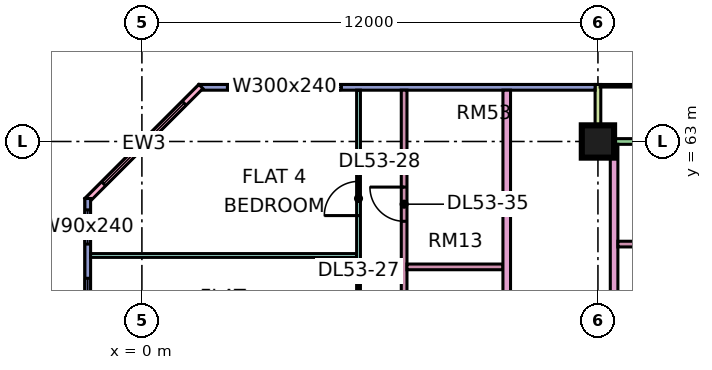
"""IFC4 building model, lengths in metres.
Left out: names, types, materials, properties, quantities, classifications, styles, units other than length and angle.
Written with IfcOpenShell. Run it as: python <this file> out.ifc"""

import sys

from ifc_helpers import new_model, si_unit, direction, frame, frame_2d, origin, origin_2d, place, context, subcontext, project, spatial, rectangle, extrude, element, fill, save


model = new_model("IFC4")
c1 = context("Model", 3, precision=1e-05, world=origin(), true_north=direction((0.0, 1.0)))
c2 = subcontext(c1, "Body", "Model", "MODEL_VIEW")
j1 = project(units=[si_unit("LENGTHUNIT", "METRE"), si_unit("PLANEANGLEUNIT", "RADIAN")], contexts=[c1])
p1 = place(None, origin())
s1 = spatial("IfcSite", under=j1, at=p1, CompositionType="ELEMENT")
p2 = place(p1, origin())
s2 = spatial("IfcBuilding", under=s1, at=p2, CompositionType="ELEMENT")
p3 = place(p2, frame((0.0, 0.0, 226.65)))
s3 = spatial("IfcBuildingStorey", under=s2, at=p3, CompositionType="ELEMENT", Elevation=226.65)
p4 = place(p3, frame((12.0, 63.0, 0.0), z_axis=(0.0, 0.0, 1.0), x_axis=(1.0, 0.0, 0.0)))
e1 = element("IfcColumn", 1, at=p4, inside=s3, PredefinedType="COLUMN", context=c2, shape_type="SweptSolid", body=[
    extrude(rectangle(XDim=0.85, YDim=0.85, at=origin_2d()), origin(), (0.0, 0.0, 1.0), 3.75),
])
p5 = place(p3, frame((22.425, 63.0, 0.0), z_axis=(0.0, 0.0, 1.0), x_axis=(-1.0, 0.0, 0.0)))
e2 = element("IfcWall", 2, at=p5, inside=s3, PredefinedType="SOLIDWALL", context=c2, shape_type="SweptSolid", body=[
    extrude(rectangle(XDim=10.35, YDim=0.15, at=frame_2d((5.175, 0.0))), origin(), (0.0, 0.0, 1.0), 3.35),
])
p6 = place(p5, frame((1.4, 0.0, 0.0)))
e3 = element("IfcOpeningElement", 3, at=p6, cuts=e2, PredefinedType="OPENING", context=c2, shape_type="SweptSolid", body=[
    extrude(rectangle(XDim=1.8, YDim=2.4, at=frame_2d((0.9, 1.2))), frame((0.0, 0.085, 0.0), z_axis=(0.0, -1.0, 0.0), x_axis=(1.0, 0.0, 0.0)), (0.0, 0.0, 1.0), 0.17),
])
p7 = place(p5, frame((5.75, 0.0, 0.45)))
e4 = element("IfcOpeningElement", 4, at=p7, cuts=e2, PredefinedType="OPENING", context=c2, shape_type="SweptSolid", body=[
    extrude(rectangle(XDim=3.0, YDim=2.4, at=frame_2d((1.5, 1.2))), frame((0.0, 0.085, 0.0), z_axis=(0.0, -1.0, 0.0), x_axis=(1.0, 0.0, 0.0)), (0.0, 0.0, 1.0), 0.17),
])
p8 = place(p3, frame((12.0, 64.5, 0.0), z_axis=(0.0, 0.0, 1.0), x_axis=(0.0, -1.0, 0.0)))
e5 = element("IfcWall", 5, at=p8, inside=s3, PredefinedType="SOLIDWALL", context=c2, shape_type="SweptSolid", body=[
    extrude(rectangle(XDim=1.5, YDim=0.15, at=frame_2d((0.75, 0.0))), origin(), (0.0, 0.0, 1.0), 3.35),
])
p9 = place(p3, frame((11.925, 64.425, 0.0), z_axis=(0.0, 0.0, 1.0), x_axis=(-1.0, 0.0, 0.0)))
e6 = element("IfcWall", 6, at=p9, inside=s3, PredefinedType="SOLIDWALL", context=c2, shape_type="SweptSolid", body=[
    extrude(rectangle(XDim=10.425, YDim=0.15, at=frame_2d((5.212, 0.0))), origin(), (0.0, 0.0, 1.0), 3.35),
])
p10 = place(p9, frame((6.675, 0.0, 0.45)))
e7 = element("IfcOpeningElement", 7, at=p10, cuts=e6, PredefinedType="OPENING", context=c2, shape_type="SweptSolid", body=[
    extrude(rectangle(XDim=3.0, YDim=2.4, at=frame_2d((1.5, 1.2))), frame((0.0, 0.085, 0.0), z_axis=(0.0, -1.0, 0.0), x_axis=(1.0, 0.0, 0.0)), (0.0, 0.0, 1.0), 0.17),
])
p11 = place(p3, frame((1.553, 64.447, 0.0), z_axis=(0.0, 0.0, 1.0), x_axis=(-0.707106781187, -0.707106781187, 0.0)))
e8 = element("IfcWall", 8, at=p11, inside=s3, PredefinedType="SOLIDWALL", context=c2, shape_type="SweptSolid", body=[
    extrude(rectangle(XDim=4.243, YDim=0.15, at=frame_2d((2.121, 0.0))), origin(), (0.0, 0.0, 1.0), 3.35),
])
p12 = place(p11, frame((0.621, 0.0, 0.45)))
e9 = element("IfcOpeningElement", 9, at=p12, cuts=e8, PredefinedType="OPENING", context=c2, shape_type="SweptSolid", body=[
    extrude(rectangle(XDim=3.0, YDim=2.4, at=frame_2d((1.5, 1.2))), frame((0.0, 0.085, 0.0), z_axis=(0.0, -1.0, 0.0), x_axis=(1.0, 0.0, 0.0)), (0.0, 0.0, 1.0), 0.17),
])
p13 = place(p3, frame((-1.425, 61.5, 0.0), z_axis=(0.0, 0.0, 1.0), x_axis=(0.0, -1.0, 0.0)))
e10 = element("IfcWall", 10, at=p13, inside=s3, PredefinedType="SOLIDWALL", context=c2, shape_type="SweptSolid", body=[
    extrude(rectangle(XDim=13.425, YDim=0.15, at=frame_2d((6.712, 0.0))), origin(), (0.0, 0.0, 1.0), 3.35),
])
p14 = place(p13, frame((0.3, 0.0, 0.45)))
e11 = element("IfcOpeningElement", 11, at=p14, cuts=e10, PredefinedType="OPENING", context=c2, shape_type="SweptSolid", body=[
    extrude(rectangle(XDim=0.9, YDim=2.4, at=frame_2d((0.45, 1.2))), frame((0.0, 0.085, 0.0), z_axis=(0.0, -1.0, 0.0), x_axis=(1.0, 0.0, 0.0)), (0.0, 0.0, 1.0), 0.17),
])
p15 = place(p13, frame((2.1, 0.0, 0.45)))
e12 = element("IfcOpeningElement", 12, at=p15, cuts=e10, PredefinedType="OPENING", context=c2, shape_type="SweptSolid", body=[
    extrude(rectangle(XDim=1.8, YDim=2.4, at=frame_2d((0.9, 1.2))), frame((0.0, 0.085, 0.0), z_axis=(0.0, -1.0, 0.0), x_axis=(1.0, 0.0, 0.0)), (0.0, 0.0, 1.0), 0.17),
])
p16 = place(p13, frame((5.1, 0.0, 0.45)))
e13 = element("IfcOpeningElement", 13, at=p16, cuts=e10, PredefinedType="OPENING", context=c2, shape_type="SweptSolid", body=[
    extrude(rectangle(XDim=1.8, YDim=2.4, at=frame_2d((0.9, 1.2))), frame((0.0, 0.085, 0.0), z_axis=(0.0, -1.0, 0.0), x_axis=(1.0, 0.0, 0.0)), (0.0, 0.0, 1.0), 0.17),
])
p17 = place(p13, frame((8.962, 0.0, 0.45)))
e14 = element("IfcOpeningElement", 14, at=p17, cuts=e10, PredefinedType="OPENING", context=c2, shape_type="SweptSolid", body=[
    extrude(rectangle(XDim=3.0, YDim=2.4, at=frame_2d((1.5, 1.2))), frame((0.0, 0.085, 0.0), z_axis=(0.0, -1.0, 0.0), x_axis=(1.0, 0.0, 0.0)), (0.0, 0.0, 1.0), 0.17),
])
p18 = place(p3, frame((-1.351, 60.0, 0.0), z_axis=(0.0, 0.0, 1.0), x_axis=(1.0, 0.0, 0.0)))
e15 = element("IfcWall", 15, at=p18, inside=s3, PredefinedType="PARTITIONING", context=c2, shape_type="SweptSolid", body=[
    extrude(rectangle(XDim=7.001, YDim=0.1, at=frame_2d((3.5, 0.0))), origin(), (0.0, 0.0, 1.0), 3.35),
])
p19 = place(p3, frame((5.7, 36.1, 0.0), z_axis=(0.0, 0.0, 1.0), x_axis=(0.0, 1.0, 0.0)))
e16 = element("IfcWall", 16, at=p19, inside=s3, PredefinedType="PARTITIONING", context=c2, shape_type="SweptSolid", body=[
    extrude(rectangle(XDim=28.25, YDim=0.1, at=frame_2d((14.125, 0.0))), origin(), (0.0, 0.0, 1.0), 3.35),
])
p20 = place(p19, frame((0.95, 0.0, 0.0)))
e17 = element("IfcOpeningElement", 17, at=p20, cuts=e16, PredefinedType="OPENING", context=c2, shape_type="SweptSolid", body=[
    extrude(rectangle(XDim=0.9, YDim=2.1, at=frame_2d((0.45, 1.05))), frame((0.0, 0.06, 0.0), z_axis=(0.0, -1.0, 0.0), x_axis=(1.0, 0.0, 0.0)), (0.0, 0.0, 1.0), 0.12),
])
p21 = place(p19, frame((3.95, 0.0, 0.0)))
e18 = element("IfcOpeningElement", 18, at=p21, cuts=e16, PredefinedType="OPENING", context=c2, shape_type="SweptSolid", body=[
    extrude(rectangle(XDim=0.9, YDim=2.1, at=frame_2d((0.45, 1.05))), frame((0.0, 0.06, 0.0), z_axis=(0.0, -1.0, 0.0), x_axis=(1.0, 0.0, 0.0)), (0.0, 0.0, 1.0), 0.12),
])
p22 = place(p19, frame((6.95, 0.0, 0.0)))
e19 = element("IfcOpeningElement", 19, at=p22, cuts=e16, PredefinedType="OPENING", context=c2, shape_type="SweptSolid", body=[
    extrude(rectangle(XDim=0.9, YDim=2.1, at=frame_2d((0.45, 1.05))), frame((0.0, 0.06, 0.0), z_axis=(0.0, -1.0, 0.0), x_axis=(1.0, 0.0, 0.0)), (0.0, 0.0, 1.0), 0.12),
])
p23 = place(p19, frame((18.95, 0.0, 0.0)))
e20 = element("IfcOpeningElement", 20, at=p23, cuts=e16, PredefinedType="OPENING", context=c2, shape_type="SweptSolid", body=[
    extrude(rectangle(XDim=0.9, YDim=2.1, at=frame_2d((0.45, 1.05))), frame((0.0, 0.06, 0.0), z_axis=(0.0, -1.0, 0.0), x_axis=(1.0, 0.0, 0.0)), (0.0, 0.0, 1.0), 0.12),
])
p24 = place(p19, frame((21.95, 0.0, 0.0)))
e21 = element("IfcOpeningElement", 21, at=p24, cuts=e16, PredefinedType="OPENING", context=c2, shape_type="SweptSolid", body=[
    extrude(rectangle(XDim=0.9, YDim=2.1, at=frame_2d((0.45, 1.05))), frame((0.0, 0.06, 0.0), z_axis=(0.0, -1.0, 0.0), x_axis=(1.0, 0.0, 0.0)), (0.0, 0.0, 1.0), 0.12),
])
p25 = place(p19, frame((24.95, 0.0, 0.0)))
e22 = element("IfcOpeningElement", 22, at=p25, cuts=e16, PredefinedType="OPENING", context=c2, shape_type="SweptSolid", body=[
    extrude(rectangle(XDim=0.9, YDim=2.1, at=frame_2d((0.45, 1.05))), frame((0.0, 0.06, 0.0), z_axis=(0.0, -1.0, 0.0), x_axis=(1.0, 0.0, 0.0)), (0.0, 0.0, 1.0), 0.12),
])
p26 = place(p19, frame((12.95, 0.0, 0.0)))
e23 = element("IfcOpeningElement", 23, at=p26, cuts=e16, PredefinedType="OPENING", context=c2, shape_type="SweptSolid", body=[
    extrude(rectangle(XDim=0.9, YDim=2.1, at=frame_2d((0.45, 1.05))), frame((0.0, 0.06, 0.0), z_axis=(0.0, -1.0, 0.0), x_axis=(1.0, 0.0, 0.0)), (0.0, 0.0, 1.0), 0.12),
])
p27 = place(p3, frame((6.9, 39.25, 0.0), z_axis=(0.0, 0.0, 1.0), x_axis=(0.0, 1.0, 0.0)))
e24 = element("IfcWall", 24, at=p27, inside=s3, PredefinedType="PARTITIONING", context=c2, shape_type="SweptSolid", body=[
    extrude(rectangle(XDim=25.1, YDim=0.15, at=frame_2d((12.55, 0.0))), origin(), (0.0, 0.0, 1.0), 3.35),
])
p28 = place(p27, frame((9.5, 0.0, 0.0)))
e25 = element("IfcOpeningElement", 25, at=p28, cuts=e24, PredefinedType="OPENING", context=c2, shape_type="SweptSolid", body=[
    extrude(rectangle(XDim=0.8, YDim=2.1, at=frame_2d((0.4, 1.05))), frame((0.0, 0.085, 0.0), z_axis=(0.0, -1.0, 0.0), x_axis=(1.0, 0.0, 0.0)), (0.0, 0.0, 1.0), 0.17),
])
p29 = place(p27, frame((12.65, 0.0, 0.0)))
e26 = element("IfcOpeningElement", 26, at=p29, cuts=e24, PredefinedType="OPENING", context=c2, shape_type="SweptSolid", body=[
    extrude(rectangle(XDim=0.9, YDim=2.1, at=frame_2d((0.45, 1.05))), frame((0.0, 0.085, 0.0), z_axis=(0.0, -1.0, 0.0), x_axis=(1.0, 0.0, 0.0)), (0.0, 0.0, 1.0), 0.17),
])
p30 = place(p27, frame((18.8, 0.0, 0.0)))
e27 = element("IfcOpeningElement", 27, at=p30, cuts=e24, PredefinedType="OPENING", context=c2, shape_type="SweptSolid", body=[
    extrude(rectangle(XDim=0.8, YDim=2.1, at=frame_2d((0.4, 1.05))), frame((0.0, 0.085, 0.0), z_axis=(0.0, -1.0, 0.0), x_axis=(1.0, 0.0, 0.0)), (0.0, 0.0, 1.0), 0.17),
])
p31 = place(p27, frame((6.8, 0.0, 0.0)))
e28 = element("IfcOpeningElement", 28, at=p31, cuts=e24, PredefinedType="OPENING", context=c2, shape_type="SweptSolid", body=[
    extrude(rectangle(XDim=0.9, YDim=2.1, at=frame_2d((0.45, 1.05))), frame((0.0, 0.085, 0.0), z_axis=(0.0, -1.0, 0.0), x_axis=(1.0, 0.0, 0.0)), (0.0, 0.0, 1.0), 0.17),
])
p32 = place(p27, frame((21.65, 0.0, 0.0)))
e29 = element("IfcOpeningElement", 29, at=p32, cuts=e24, PredefinedType="OPENING", context=c2, shape_type="SweptSolid", body=[
    extrude(rectangle(XDim=0.9, YDim=2.1, at=frame_2d((0.45, 1.05))), frame((0.0, 0.085, 0.0), z_axis=(0.0, -1.0, 0.0), x_axis=(1.0, 0.0, 0.0)), (0.0, 0.0, 1.0), 0.17),
])
p33 = place(p27, frame((3.95, 0.0, 0.0)))
e30 = element("IfcOpeningElement", 30, at=p33, cuts=e24, PredefinedType="OPENING", context=c2, shape_type="SweptSolid", body=[
    extrude(rectangle(XDim=0.8, YDim=2.1, at=frame_2d((0.4, 1.05))), frame((0.0, 0.085, 0.0), z_axis=(0.0, -1.0, 0.0), x_axis=(1.0, 0.0, 0.0)), (0.0, 0.0, 1.0), 0.17),
])
p34 = place(p27, frame((15.8, 0.0, 0.0)))
e31 = element("IfcOpeningElement", 31, at=p34, cuts=e24, PredefinedType="OPENING", context=c2, shape_type="SweptSolid", body=[
    extrude(rectangle(XDim=0.8, YDim=2.1, at=frame_2d((0.4, 1.05))), frame((0.0, 0.085, 0.0), z_axis=(0.0, -1.0, 0.0), x_axis=(1.0, 0.0, 0.0)), (0.0, 0.0, 1.0), 0.17),
])
p35 = place(p3, frame((6.975, 59.7, 0.0), z_axis=(0.0, 0.0, 1.0), x_axis=(1.0, 0.0, 0.0)))
e32 = element("IfcWall", 32, at=p35, inside=s3, PredefinedType="PARTITIONING", context=c2, shape_type="SweptSolid", body=[
    extrude(rectangle(XDim=2.525, YDim=0.15, at=frame_2d((1.262, 0.0))), origin(), (0.0, 0.0, 1.0), 3.35),
])
p36 = place(p3, frame((9.6, 20.0, 0.0), z_axis=(0.0, 0.0, 1.0), x_axis=(0.0, 1.0, 0.0)))
e33 = element("IfcWall", 33, at=p36, inside=s3, PredefinedType="PARTITIONING", context=c2, shape_type="SweptSolid", body=[
    extrude(rectangle(XDim=44.35, YDim=0.2, at=frame_2d((22.175, 0.0))), origin(), (0.0, 0.0, 1.0), 3.35),
])
p37 = place(p36, frame((17.1, 0.0, 0.0)))
e34 = element("IfcOpeningElement", 34, at=p37, cuts=e33, PredefinedType="OPENING", context=c2, shape_type="SweptSolid", body=[
    extrude(rectangle(XDim=1.0, YDim=2.1, at=frame_2d((0.5, 1.05))), frame((0.0, 0.11, 0.0), z_axis=(0.0, -1.0, 0.0), x_axis=(1.0, 0.0, 0.0)), (0.0, 0.0, 1.0), 0.22),
])
p38 = place(p36, frame((0.6, 0.0, 0.0)))
e35 = element("IfcOpeningElement", 35, at=p38, cuts=e33, PredefinedType="OPENING", context=c2, shape_type="SweptSolid", body=[
    extrude(rectangle(XDim=1.2, YDim=2.1, at=frame_2d((0.6, 1.05))), frame((0.0, 0.11, 0.0), z_axis=(0.0, -1.0, 0.0), x_axis=(1.0, 0.0, 0.0)), (0.0, 0.0, 1.0), 0.22),
])
p39 = place(p36, frame((3.9, 0.0, 0.0)))
e36 = element("IfcOpeningElement", 36, at=p39, cuts=e33, PredefinedType="OPENING", context=c2, shape_type="SweptSolid", body=[
    extrude(rectangle(XDim=1.0, YDim=2.1, at=frame_2d((0.5, 1.05))), frame((0.0, 0.11, 0.0), z_axis=(0.0, -1.0, 0.0), x_axis=(1.0, 0.0, 0.0)), (0.0, 0.0, 1.0), 0.22),
])
p40 = place(p3, frame((12.425, 20.0, 0.0), z_axis=(0.0, 0.0, 1.0), x_axis=(0.0, 1.0, 0.0)))
e37 = element("IfcWall", 37, at=p40, inside=s3, PredefinedType="PARTITIONING", context=c2, shape_type="SweptSolid", body=[
    extrude(rectangle(XDim=42.926, YDim=0.2, at=frame_2d((21.463, 0.0))), origin(), (0.0, 0.0, 1.0), 3.35),
])
p41 = place(p40, frame((6.7, 0.0, 0.0)))
e38 = element("IfcOpeningElement", 38, at=p41, cuts=e37, PredefinedType="OPENING", context=c2, shape_type="SweptSolid", body=[
    extrude(rectangle(XDim=1.6, YDim=2.1, at=frame_2d((0.8, 1.05))), frame((0.0, 0.11, 0.0), z_axis=(0.0, -1.0, 0.0), x_axis=(1.0, 0.0, 0.0)), (0.0, 0.0, 1.0), 0.22),
])
p42 = place(p40, frame((12.95, 0.0, 0.0)))
e39 = element("IfcOpeningElement", 39, at=p42, cuts=e37, PredefinedType="OPENING", context=c2, shape_type="SweptSolid", body=[
    extrude(rectangle(XDim=1.0, YDim=2.1, at=frame_2d((0.5, 1.05))), frame((0.0, 0.11, 0.0), z_axis=(0.0, -1.0, 0.0), x_axis=(1.0, 0.0, 0.0)), (0.0, 0.0, 1.0), 0.22),
])
p43 = place(p40, frame((23.2, 0.0, 0.0)))
e40 = element("IfcOpeningElement", 40, at=p43, cuts=e37, PredefinedType="OPENING", context=c2, shape_type="SweptSolid", body=[
    extrude(rectangle(XDim=1.0, YDim=2.1, at=frame_2d((0.5, 1.05))), frame((0.0, 0.11, 0.0), z_axis=(0.0, -1.0, 0.0), x_axis=(1.0, 0.0, 0.0)), (0.0, 0.0, 1.0), 0.22),
])
p44 = place(p40, frame((35.35, 0.0, 0.0)))
e41 = element("IfcOpeningElement", 41, at=p44, cuts=e37, PredefinedType="OPENING", context=c2, shape_type="SweptSolid", body=[
    extrude(rectangle(XDim=1.0, YDim=2.1, at=frame_2d((0.5, 1.05))), frame((0.0, 0.11, 0.0), z_axis=(0.0, -1.0, 0.0), x_axis=(1.0, 0.0, 0.0)), (0.0, 0.0, 1.0), 0.22),
])
p45 = place(p40, frame((1.15, 0.0, 0.0)))
e42 = element("IfcOpeningElement", 42, at=p45, cuts=e37, PredefinedType="OPENING", context=c2, shape_type="SweptSolid", body=[
    extrude(rectangle(XDim=1.8, YDim=2.1, at=frame_2d((0.9, 1.05))), frame((0.0, 0.11, 0.0), z_axis=(0.0, -1.0, 0.0), x_axis=(1.0, 0.0, 0.0)), (0.0, 0.0, 1.0), 0.22),
])
p46 = place(p40, frame((28.6, 0.0, 0.0)))
e43 = element("IfcOpeningElement", 43, at=p46, cuts=e37, PredefinedType="OPENING", context=c2, shape_type="SweptSolid", body=[
    extrude(rectangle(XDim=1.8, YDim=2.1, at=frame_2d((0.9, 1.05))), frame((0.0, 0.11, 0.0), z_axis=(0.0, -1.0, 0.0), x_axis=(1.0, 0.0, 0.0)), (0.0, 0.0, 1.0), 0.22),
])
p47 = place(p3, frame((12.525, 60.3, 0.0), z_axis=(0.0, 0.0, 1.0), x_axis=(1.0, 0.0, 0.0)))
e44 = element("IfcWall", 44, at=p47, inside=s3, PredefinedType="PARTITIONING", context=c2, shape_type="SweptSolid", body=[
    extrude(rectangle(XDim=5.225, YDim=0.15, at=frame_2d((2.613, 0.0))), origin(), (0.0, 0.0, 1.0), 3.35),
])
p48 = place(p10, origin())
e45 = element("IfcWindow", 45, at=p48, inside=s3, PartitioningType="SINGLE_PANEL", PredefinedType="WINDOW", context=c2, shape_type="SweptSolid", body=[
    extrude(rectangle(XDim=3.0, YDim=2.4, at=frame_2d((1.5, 1.2))), frame((0.0, 0.03, 0.0), z_axis=(0.0, -1.0, 0.0), x_axis=(1.0, 0.0, 0.0)), (0.0, 0.0, 1.0), 0.06),
])
fill(e7, e45)
p49 = place(p12, origin())
e46 = element("IfcWindow", 46, at=p49, inside=s3, PartitioningType="SINGLE_PANEL", PredefinedType="WINDOW", context=c2, shape_type="SweptSolid", body=[
    extrude(rectangle(XDim=3.0, YDim=2.4, at=frame_2d((1.5, 1.2))), frame((0.0, 0.03, 0.0), z_axis=(0.0, -1.0, 0.0), x_axis=(1.0, 0.0, 0.0)), (0.0, 0.0, 1.0), 0.06),
])
fill(e9, e46)
p50 = place(p14, origin())
e47 = element("IfcWindow", 47, at=p50, inside=s3, PartitioningType="SINGLE_PANEL", PredefinedType="WINDOW", context=c2, shape_type="SweptSolid", body=[
    extrude(rectangle(XDim=0.9, YDim=2.4, at=frame_2d((0.45, 1.2))), frame((0.0, 0.03, 0.0), z_axis=(0.0, -1.0, 0.0), x_axis=(1.0, 0.0, 0.0)), (0.0, 0.0, 1.0), 0.06),
])
fill(e11, e47)
p51 = place(p15, origin())
e48 = element("IfcWindow", 48, at=p51, inside=s3, PartitioningType="SINGLE_PANEL", PredefinedType="WINDOW", context=c2, shape_type="SweptSolid", body=[
    extrude(rectangle(XDim=1.8, YDim=2.4, at=frame_2d((0.9, 1.2))), frame((0.0, 0.03, 0.0), z_axis=(0.0, -1.0, 0.0), x_axis=(1.0, 0.0, 0.0)), (0.0, 0.0, 1.0), 0.06),
])
fill(e12, e48)
p52 = place(p25, origin())
e49 = element("IfcDoor", 49, at=p52, inside=s3, OperationType="SINGLE_SWING_LEFT", PredefinedType="DOOR", context=c2, shape_type="SweptSolid", body=[
    extrude(rectangle(XDim=0.9, YDim=2.1, at=frame_2d((0.45, 1.05))), frame((0.0, 0.025, 0.0), z_axis=(0.0, -1.0, 0.0), x_axis=(1.0, 0.0, 0.0)), (0.0, 0.0, 1.0), 0.05),
])
fill(e22, e49)
p53 = place(p32, frame((0.9, 0.0, 0.0), z_axis=(0.0, 0.0, 1.0), x_axis=(-1.0, 0.0, 0.0)))
e50 = element("IfcDoor", 50, at=p53, inside=s3, OperationType="SINGLE_SWING_RIGHT", PredefinedType="DOOR", context=c2, shape_type="SweptSolid", body=[
    extrude(rectangle(XDim=0.9, YDim=2.1, at=frame_2d((0.45, 1.05))), frame((0.0, 0.025, 0.0), z_axis=(0.0, -1.0, 0.0), x_axis=(1.0, 0.0, 0.0)), (0.0, 0.0, 1.0), 0.05),
])
fill(e29, e50)
save(model, sys.argv[1])
